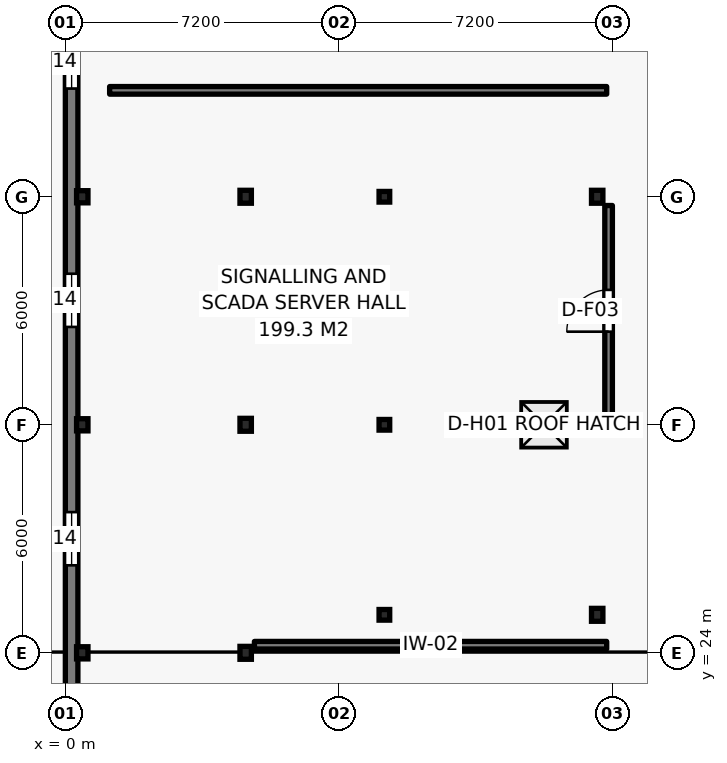
"""IFC4 building model, lengths in metres.
Left out: names, types, materials, properties, quantities, classifications, styles, units other than length and angle.
Written with IfcOpenShell. Run it as: python <this file> out.ifc"""

import sys

from ifc_helpers import new_model, si_unit, direction, frame, frame_2d, origin, origin_2d, place, context, subcontext, project, spatial, rectangle, i_section, extrude, element, fill, save


model = new_model("IFC4")
c1 = context("Model", 3, precision=1e-05, world=origin(), true_north=direction((0.0, 1.0)))
c2 = subcontext(c1, "Body", "Model", "MODEL_VIEW")
j1 = project(units=[si_unit("LENGTHUNIT", "METRE"), si_unit("PLANEANGLEUNIT", "RADIAN")], contexts=[c1])
p1 = place(None, origin())
s1 = spatial("IfcSite", under=j1, at=p1, CompositionType="ELEMENT")
p2 = place(p1, origin())
s2 = spatial("IfcBuilding", under=s1, at=p2, CompositionType="ELEMENT")
p3 = place(p2, frame((0.0, 0.0, 18.75)))
s3 = spatial("IfcBuildingStorey", under=s2, at=p3, CompositionType="ELEMENT", Elevation=18.75)
for number, where, z_axis, x_axis in (
    (1, (0.45, 24.0, 0.0), (0.0, 0.0, 1.0), (1.0, 0.0, 0.0)),
    (2, (0.45, 30.0, 0.0), (0.0, 0.0, 1.0), (1.0, 0.0, 0.0)),
    (3, (0.45, 36.0, 0.0), (0.0, 0.0, 1.0), (1.0, 0.0, 0.0)),
):
    element("IfcColumn", number, at=place(p3, frame(where, z_axis=z_axis, x_axis=x_axis)), inside=s3, PredefinedType="COLUMN", context=c2, shape_type="SweptSolid", body=[
        extrude(i_section(OverallWidth=0.3, OverallDepth=0.32, WebThickness=0.011, FlangeThickness=0.021, FilletRadius=0.027, at=origin_2d()), origin(), (0.0, 0.0, 1.0), 3.71),
    ])
for number, where, z_axis, x_axis in (
    (4, (4.75, 24.0, 0.0), (0.0, 0.0, 1.0), (1.0, 0.0, 0.0)),
    (5, (4.75, 30.0, 0.0), (0.0, 0.0, 1.0), (1.0, 0.0, 0.0)),
    (6, (4.75, 36.0, 0.0), (0.0, 0.0, 1.0), (1.0, 0.0, 0.0)),
):
    element("IfcColumn", number, at=place(p3, frame(where, z_axis=z_axis, x_axis=x_axis)), inside=s3, PredefinedType="COLUMN", context=c2, shape_type="SweptSolid", body=[
        extrude(i_section(OverallWidth=0.3, OverallDepth=0.34, WebThickness=0.012, FlangeThickness=0.021, FilletRadius=0.027, at=origin_2d()), origin(), (0.0, 0.0, 1.0), 3.71),
    ])
for number, where, z_axis, x_axis in (
    (7, (8.4, 25.0, 0.0), (0.0, 0.0, 1.0), (1.0, 0.0, 0.0)),
    (8, (8.4, 30.0, 0.0), (0.0, 0.0, 1.0), (1.0, 0.0, 0.0)),
    (9, (8.4, 36.0, 0.0), (0.0, 0.0, 1.0), (1.0, 0.0, 0.0)),
):
    element("IfcColumn", number, at=place(p3, frame(where, z_axis=z_axis, x_axis=x_axis)), inside=s3, PredefinedType="COLUMN", context=c2, shape_type="SweptSolid", body=[
        extrude(i_section(OverallWidth=0.28, OverallDepth=0.28, WebThickness=0.01, FlangeThickness=0.018, FilletRadius=0.024, at=origin_2d()), origin(), (0.0, 0.0, 1.0), 3.71),
    ])
for number, where, z_axis, x_axis in (
    (10, (14.0, 25.0, 0.0), (0.0, 0.0, 1.0), (1.0, 0.0, 0.0)),
    (11, (14.0, 30.0, 0.0), (0.0, 0.0, 1.0), (1.0, 0.0, 0.0)),
    (12, (14.0, 36.0, 0.0), (0.0, 0.0, 1.0), (1.0, 0.0, 0.0)),
):
    element("IfcColumn", number, at=place(p3, frame(where, z_axis=z_axis, x_axis=x_axis)), inside=s3, PredefinedType="COLUMN", context=c2, shape_type="SweptSolid", body=[
        extrude(i_section(OverallWidth=0.3, OverallDepth=0.34, WebThickness=0.012, FlangeThickness=0.021, FilletRadius=0.027, at=origin_2d()), origin(), (0.0, 0.0, 1.0), 3.71),
    ])
p4 = place(p3, frame((0.17, 53.66, 0.0), z_axis=(0.0, 0.0, 1.0), x_axis=(0.0, -1.0, 0.0)))
e13 = element("IfcWall", 13, at=p4, inside=s3, PredefinedType="SOLIDWALL", context=c2, shape_type="SweptSolid", body=[
    extrude(rectangle(XDim=53.315, YDim=0.33, at=frame_2d((26.657, 0.0))), origin(), (0.0, 0.0, 1.0), 3.345),
])
p5 = place(p4, frame((0.868, 0.0, 1.005)))
e14 = element("IfcOpeningElement", 14, at=p5, cuts=e13, PredefinedType="OPENING", context=c2, shape_type="SweptSolid", body=[
    extrude(rectangle(XDim=1.4, YDim=2.1, at=frame_2d((0.7, 1.05))), frame((0.0, 0.175, 0.0), z_axis=(0.0, -1.0, 0.0), x_axis=(1.0, 0.0, 0.0)), (0.0, 0.0, 1.0), 0.35),
])
p6 = place(p4, frame((7.14, 0.0, 1.005)))
e15 = element("IfcOpeningElement", 15, at=p6, cuts=e13, PredefinedType="OPENING", context=c2, shape_type="SweptSolid", body=[
    extrude(rectangle(XDim=1.4, YDim=2.1, at=frame_2d((0.7, 1.05))), frame((0.0, 0.175, 0.0), z_axis=(0.0, -1.0, 0.0), x_axis=(1.0, 0.0, 0.0)), (0.0, 0.0, 1.0), 0.35),
])
p7 = place(p4, frame((13.413, 0.0, 1.005)))
e16 = element("IfcOpeningElement", 16, at=p7, cuts=e13, PredefinedType="OPENING", context=c2, shape_type="SweptSolid", body=[
    extrude(rectangle(XDim=1.4, YDim=2.1, at=frame_2d((0.7, 1.05))), frame((0.0, 0.175, 0.0), z_axis=(0.0, -1.0, 0.0), x_axis=(1.0, 0.0, 0.0)), (0.0, 0.0, 1.0), 0.35),
])
p8 = place(p4, frame((19.685, 0.0, 1.005)))
e17 = element("IfcOpeningElement", 17, at=p8, cuts=e13, PredefinedType="OPENING", context=c2, shape_type="SweptSolid", body=[
    extrude(rectangle(XDim=1.4, YDim=2.1, at=frame_2d((0.7, 1.05))), frame((0.0, 0.175, 0.0), z_axis=(0.0, -1.0, 0.0), x_axis=(1.0, 0.0, 0.0)), (0.0, 0.0, 1.0), 0.35),
])
p9 = place(p4, frame((25.958, 0.0, 1.005)))
e18 = element("IfcOpeningElement", 18, at=p9, cuts=e13, PredefinedType="OPENING", context=c2, shape_type="SweptSolid", body=[
    extrude(rectangle(XDim=1.4, YDim=2.1, at=frame_2d((0.7, 1.05))), frame((0.0, 0.175, 0.0), z_axis=(0.0, -1.0, 0.0), x_axis=(1.0, 0.0, 0.0)), (0.0, 0.0, 1.0), 0.35),
])
p10 = place(p4, frame((32.23, 0.0, 1.005)))
e19 = element("IfcOpeningElement", 19, at=p10, cuts=e13, PredefinedType="OPENING", context=c2, shape_type="SweptSolid", body=[
    extrude(rectangle(XDim=1.4, YDim=2.1, at=frame_2d((0.7, 1.05))), frame((0.0, 0.175, 0.0), z_axis=(0.0, -1.0, 0.0), x_axis=(1.0, 0.0, 0.0)), (0.0, 0.0, 1.0), 0.35),
])
p11 = place(p4, frame((38.502, 0.0, 1.005)))
e20 = element("IfcOpeningElement", 20, at=p11, cuts=e13, PredefinedType="OPENING", context=c2, shape_type="SweptSolid", body=[
    extrude(rectangle(XDim=1.4, YDim=2.1, at=frame_2d((0.7, 1.05))), frame((0.0, 0.175, 0.0), z_axis=(0.0, -1.0, 0.0), x_axis=(1.0, 0.0, 0.0)), (0.0, 0.0, 1.0), 0.35),
])
p12 = place(p4, frame((44.775, 0.0, 1.005)))
e21 = element("IfcOpeningElement", 21, at=p12, cuts=e13, PredefinedType="OPENING", context=c2, shape_type="SweptSolid", body=[
    extrude(rectangle(XDim=1.4, YDim=2.1, at=frame_2d((0.7, 1.05))), frame((0.0, 0.175, 0.0), z_axis=(0.0, -1.0, 0.0), x_axis=(1.0, 0.0, 0.0)), (0.0, 0.0, 1.0), 0.35),
])
p13 = place(p4, frame((51.047, 0.0, 1.005)))
e22 = element("IfcOpeningElement", 22, at=p13, cuts=e13, PredefinedType="OPENING", context=c2, shape_type="SweptSolid", body=[
    extrude(rectangle(XDim=1.4, YDim=2.1, at=frame_2d((0.7, 1.05))), frame((0.0, 0.175, 0.0), z_axis=(0.0, -1.0, 0.0), x_axis=(1.0, 0.0, 0.0)), (0.0, 0.0, 1.0), 0.35),
])
p14 = place(p3, frame((4.98, 24.2, 0.0), z_axis=(0.0, 0.0, 1.0), x_axis=(1.0, 0.0, 0.0)))
e23 = element("IfcWall", 23, at=p14, inside=s3, PredefinedType="PARTITIONING", context=c2, shape_type="SweptSolid", body=[
    extrude(rectangle(XDim=9.27, YDim=0.2, at=frame_2d((4.635, 0.0))), origin(), (0.0, 0.0, 1.0), 3.345),
])
p15 = place(p3, frame((14.3, 30.23, 0.0), z_axis=(0.0, 0.0, 1.0), x_axis=(0.0, 1.0, 0.0)))
e24 = element("IfcWall", 24, at=p15, inside=s3, PredefinedType="PARTITIONING", context=c2, shape_type="SweptSolid", body=[
    extrude(rectangle(XDim=5.54, YDim=0.2, at=frame_2d((2.77, 0.0))), origin(), (0.0, 0.0, 1.0), 3.345),
])
p16 = place(p15, frame((2.22, 0.0, 0.0)))
e25 = element("IfcOpeningElement", 25, at=p16, cuts=e24, PredefinedType="OPENING", context=c2, shape_type="SweptSolid", body=[
    extrude(rectangle(XDim=1.1, YDim=2.15, at=frame_2d((0.55, 1.075))), frame((0.0, 0.11, 0.0), z_axis=(0.0, -1.0, 0.0), x_axis=(1.0, 0.0, 0.0)), (0.0, 0.0, 1.0), 0.22),
])
p17 = place(p3, frame((14.25, 38.8, 0.0), z_axis=(0.0, 0.0, 1.0), x_axis=(-1.0, 0.0, 0.0)))
e26 = element("IfcWall", 26, at=p17, inside=s3, PredefinedType="PARTITIONING", context=c2, shape_type="SweptSolid", body=[
    extrude(rectangle(XDim=13.08, YDim=0.2, at=frame_2d((6.54, 0.0))), origin(), (0.0, 0.0, 1.0), 3.345),
])
p18 = place(p7, origin())
e27 = element("IfcWindow", 27, at=p18, inside=s3, PartitioningType="SINGLE_PANEL", PredefinedType="WINDOW", context=c2, shape_type="SweptSolid", body=[
    extrude(rectangle(XDim=1.4, YDim=2.1, at=frame_2d((0.7, 1.05))), frame((0.0, 0.03, 0.0), z_axis=(0.0, -1.0, 0.0), x_axis=(1.0, 0.0, 0.0)), (0.0, 0.0, 1.0), 0.06),
])
fill(e16, e27)
p19 = place(p8, origin())
e28 = element("IfcWindow", 28, at=p19, inside=s3, PartitioningType="SINGLE_PANEL", PredefinedType="WINDOW", context=c2, shape_type="SweptSolid", body=[
    extrude(rectangle(XDim=1.4, YDim=2.1, at=frame_2d((0.7, 1.05))), frame((0.0, 0.03, 0.0), z_axis=(0.0, -1.0, 0.0), x_axis=(1.0, 0.0, 0.0)), (0.0, 0.0, 1.0), 0.06),
])
fill(e17, e28)
p20 = place(p9, origin())
e29 = element("IfcWindow", 29, at=p20, inside=s3, PartitioningType="SINGLE_PANEL", PredefinedType="WINDOW", context=c2, shape_type="SweptSolid", body=[
    extrude(rectangle(XDim=1.4, YDim=2.1, at=frame_2d((0.7, 1.05))), frame((0.0, 0.03, 0.0), z_axis=(0.0, -1.0, 0.0), x_axis=(1.0, 0.0, 0.0)), (0.0, 0.0, 1.0), 0.06),
])
fill(e18, e29)
p21 = place(p3, frame((0.0, 0.0, 3.71)))
p22 = place(p21, frame((12.6, 30.0, 0.0)))
p23 = place(p22, frame((0.0, 0.0, 0.29)))
e30 = element("IfcDoor", 30, at=p23, inside=s3, OperationType="SINGLE_SWING_LEFT", PredefinedType="TRAPDOOR", context=c2, shape_type="SweptSolid", body=[
    extrude(rectangle(XDim=1.2, YDim=1.2, at=origin_2d()), origin(), (0.0, 0.0, 1.0), 0.05),
])
p24 = place(p16, origin())
e31 = element("IfcDoor", 31, at=p24, inside=s3, OperationType="SINGLE_SWING_LEFT", PredefinedType="DOOR", context=c2, shape_type="SweptSolid", body=[
    extrude(rectangle(XDim=1.1, YDim=2.15, at=frame_2d((0.55, 1.075))), frame((0.0, 0.025, 0.0), z_axis=(0.0, -1.0, 0.0), x_axis=(1.0, 0.0, 0.0)), (0.0, 0.0, 1.0), 0.05),
])
fill(e25, e31)
save(model, sys.argv[1])
